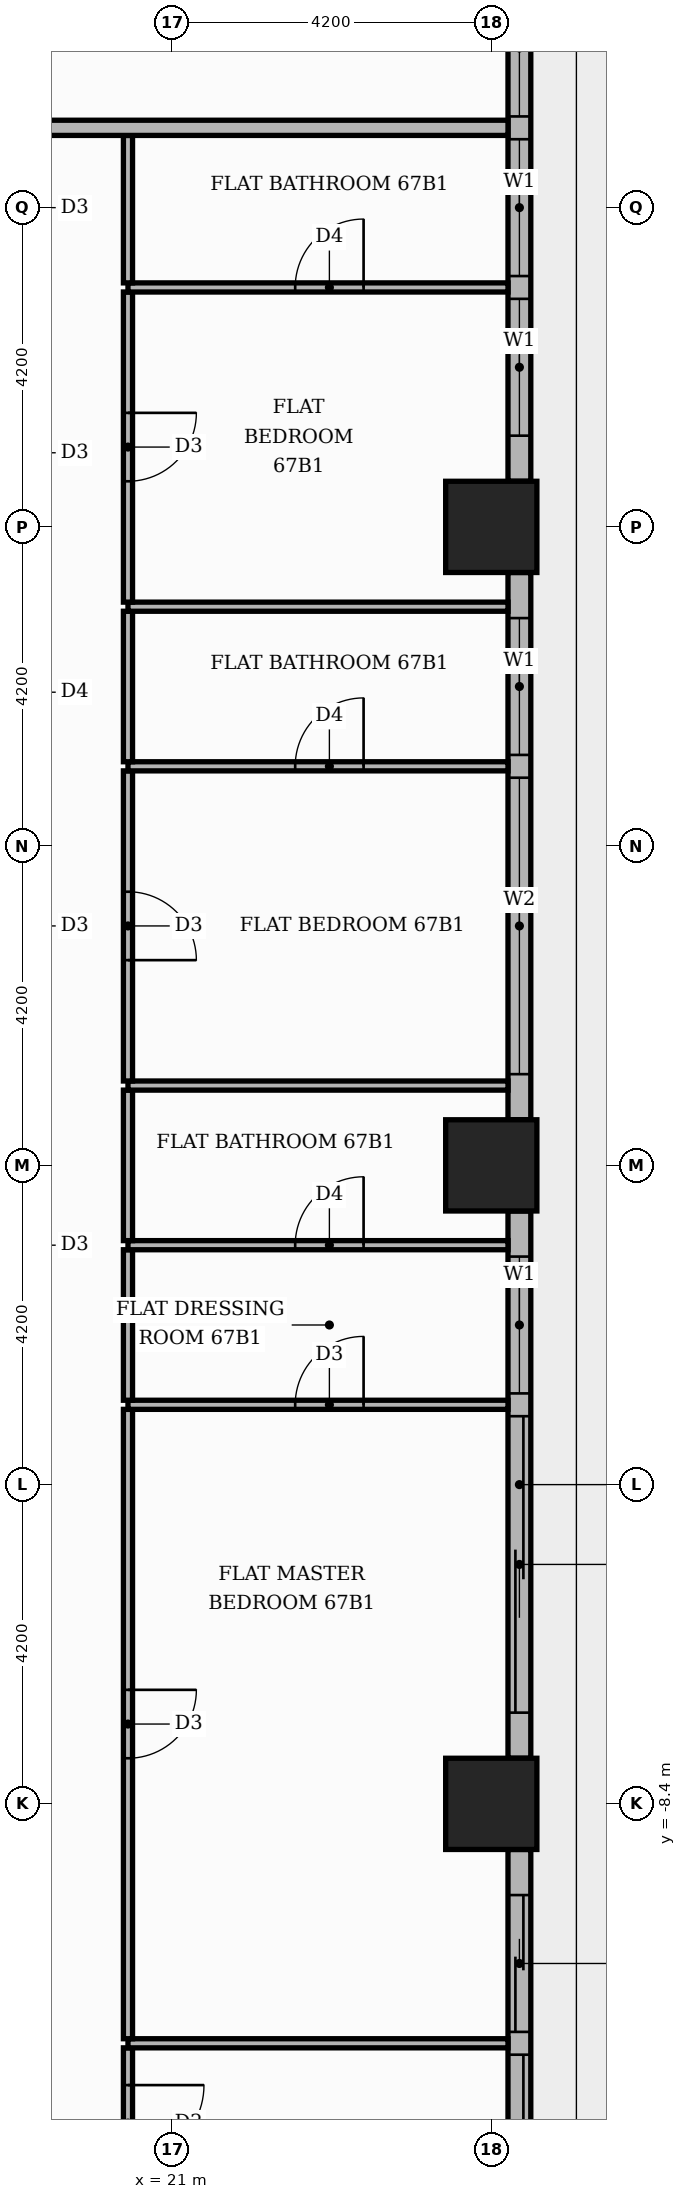
"""IFC4 building model, lengths in metres.
Left out: names, types, materials, properties, quantities, classifications, styles, units other than length and angle.
Written with IfcOpenShell. Run it as: python <this file> out.ifc"""

import sys

from ifc_helpers import new_model, si_unit, direction, frame, frame_2d, origin, origin_2d, place, context, subcontext, project, spatial, rectangle, extrude, element, fill, save


model = new_model("IFC4")
c1 = context("Model", 3, precision=1e-05, world=origin(), true_north=direction((0.0, 1.0)))
c2 = subcontext(c1, "Body", "Model", "MODEL_VIEW")
j1 = project(units=[si_unit("LENGTHUNIT", "METRE"), si_unit("PLANEANGLEUNIT", "RADIAN")], contexts=[c1])
p1 = place(None, origin())
s1 = spatial("IfcSite", under=j1, at=p1, CompositionType="ELEMENT")
p2 = place(p1, origin())
s2 = spatial("IfcBuilding", under=s1, at=p2, CompositionType="ELEMENT")
p3 = place(p2, frame((0.0, 0.0, 279.6)))
s3 = spatial("IfcBuildingStorey", under=s2, at=p3, CompositionType="ELEMENT", Elevation=279.6)
for number, where, z_axis, x_axis in (
    (1, (25.2, 0.0, 0.0), (0.0, 0.0, 1.0), (1.0, 0.0, 0.0)),
    (2, (25.2, 8.4, 0.0), (0.0, 0.0, 1.0), (1.0, 0.0, 0.0)),
    (3, (25.2, -8.4, 0.0), (0.0, 0.0, 1.0), (1.0, 0.0, 0.0)),
):
    element("IfcColumn", number, at=place(p3, frame(where, z_axis=z_axis, x_axis=x_axis)), inside=s3, PredefinedType="COLUMN", context=c2, shape_type="SweptSolid", body=[
        extrude(rectangle(XDim=1.2, YDim=1.2, at=origin_2d()), origin(), (0.0, 0.0, 1.0), 3.9),
    ])
p4 = place(p3, frame((25.57, -16.2, 0.0), z_axis=(0.0, 0.0, 1.0), x_axis=(0.0, 1.0, 0.0)))
e4 = element("IfcWall", 4, at=p4, inside=s3, PredefinedType="STANDARD", context=c2, shape_type="SweptSolid", body=[
    extrude(rectangle(XDim=7.2, YDim=0.3, at=frame_2d((3.6, 0.0))), origin(), (0.0, 0.0, 1.0), 3.48),
])
p5 = place(p4, frame((0.6, 0.0, 0.0)))
e5 = element("IfcOpeningElement", 5, at=p5, cuts=e4, PredefinedType="OPENING", context=c2, shape_type="SweptSolid", body=[
    extrude(rectangle(XDim=3.9, YDim=2.4, at=frame_2d((1.95, 1.2))), frame((0.0, 0.16, 0.0), z_axis=(0.0, -1.0, 0.0), x_axis=(1.0, 0.0, 0.0)), (0.0, 0.0, 1.0), 0.32),
])
p6 = place(p4, frame((4.8, 0.0, 0.0)))
e6 = element("IfcOpeningElement", 6, at=p6, cuts=e4, PredefinedType="OPENING", context=c2, shape_type="SweptSolid", body=[
    extrude(rectangle(XDim=1.8, YDim=2.4, at=frame_2d((0.9, 1.2))), frame((0.0, 0.16, 0.0), z_axis=(0.0, -1.0, 0.0), x_axis=(1.0, 0.0, 0.0)), (0.0, 0.0, 1.0), 0.32),
])
p7 = place(p3, frame((25.57, -7.8, 0.0), z_axis=(0.0, 0.0, 1.0), x_axis=(0.0, 1.0, 0.0)))
e7 = element("IfcWall", 7, at=p7, inside=s3, PredefinedType="STANDARD", context=c2, shape_type="SweptSolid", body=[
    extrude(rectangle(XDim=7.2, YDim=0.3, at=frame_2d((3.6, 0.0))), origin(), (0.0, 0.0, 1.0), 3.48),
])
p8 = place(p7, frame((0.6, 0.0, 0.0)))
e8 = element("IfcOpeningElement", 8, at=p8, cuts=e7, PredefinedType="OPENING", context=c2, shape_type="SweptSolid", body=[
    extrude(rectangle(XDim=3.9, YDim=2.4, at=frame_2d((1.95, 1.2))), frame((0.0, 0.16, 0.0), z_axis=(0.0, -1.0, 0.0), x_axis=(1.0, 0.0, 0.0)), (0.0, 0.0, 1.0), 0.32),
])
p9 = place(p7, frame((4.8, 0.0, 0.9)))
e9 = element("IfcOpeningElement", 9, at=p9, cuts=e7, PredefinedType="OPENING", context=c2, shape_type="SweptSolid", body=[
    extrude(rectangle(XDim=1.8, YDim=2.1, at=frame_2d((0.9, 1.05))), frame((0.0, 0.16, 0.0), z_axis=(0.0, -1.0, 0.0), x_axis=(1.0, 0.0, 0.0)), (0.0, 0.0, 1.0), 0.32),
])
p10 = place(p3, frame((25.57, 0.6, 0.0), z_axis=(0.0, 0.0, 1.0), x_axis=(0.0, 1.0, 0.0)))
e10 = element("IfcWall", 10, at=p10, inside=s3, PredefinedType="STANDARD", context=c2, shape_type="SweptSolid", body=[
    extrude(rectangle(XDim=7.2, YDim=0.3, at=frame_2d((3.6, 0.0))), origin(), (0.0, 0.0, 1.0), 3.48),
])
p11 = place(p10, frame((0.6, 0.0, 0.9)))
e11 = element("IfcOpeningElement", 11, at=p11, cuts=e10, PredefinedType="OPENING", context=c2, shape_type="SweptSolid", body=[
    extrude(rectangle(XDim=3.9, YDim=2.1, at=frame_2d((1.95, 1.05))), frame((0.0, 0.16, 0.0), z_axis=(0.0, -1.0, 0.0), x_axis=(1.0, 0.0, 0.0)), (0.0, 0.0, 1.0), 0.32),
])
p12 = place(p10, frame((4.8, 0.0, 0.9)))
e12 = element("IfcOpeningElement", 12, at=p12, cuts=e10, PredefinedType="OPENING", context=c2, shape_type="SweptSolid", body=[
    extrude(rectangle(XDim=1.8, YDim=2.1, at=frame_2d((0.9, 1.05))), frame((0.0, 0.16, 0.0), z_axis=(0.0, -1.0, 0.0), x_axis=(1.0, 0.0, 0.0)), (0.0, 0.0, 1.0), 0.32),
])
p13 = place(p3, frame((25.57, 9.0, 0.0), z_axis=(0.0, 0.0, 1.0), x_axis=(0.0, 1.0, 0.0)))
e13 = element("IfcWall", 13, at=p13, inside=s3, PredefinedType="STANDARD", context=c2, shape_type="SweptSolid", body=[
    extrude(rectangle(XDim=7.2, YDim=0.3, at=frame_2d((3.6, 0.0))), origin(), (0.0, 0.0, 1.0), 3.48),
])
p14 = place(p13, frame((0.6, 0.0, 0.9)))
e14 = element("IfcOpeningElement", 14, at=p14, cuts=e13, PredefinedType="OPENING", context=c2, shape_type="SweptSolid", body=[
    extrude(rectangle(XDim=1.8, YDim=2.1, at=frame_2d((0.9, 1.05))), frame((0.0, 0.16, 0.0), z_axis=(0.0, -1.0, 0.0), x_axis=(1.0, 0.0, 0.0)), (0.0, 0.0, 1.0), 0.32),
])
p15 = place(p13, frame((2.7, 0.0, 0.9)))
e15 = element("IfcOpeningElement", 15, at=p15, cuts=e13, PredefinedType="OPENING", context=c2, shape_type="SweptSolid", body=[
    extrude(rectangle(XDim=1.8, YDim=2.1, at=frame_2d((0.9, 1.05))), frame((0.0, 0.16, 0.0), z_axis=(0.0, -1.0, 0.0), x_axis=(1.0, 0.0, 0.0)), (0.0, 0.0, 1.0), 0.32),
])
p16 = place(p13, frame((4.8, 0.0, 0.9)))
e16 = element("IfcOpeningElement", 16, at=p16, cuts=e13, PredefinedType="OPENING", context=c2, shape_type="SweptSolid", body=[
    extrude(rectangle(XDim=1.8, YDim=2.1, at=frame_2d((0.9, 1.05))), frame((0.0, 0.16, 0.0), z_axis=(0.0, -1.0, 0.0), x_axis=(1.0, 0.0, 0.0)), (0.0, 0.0, 1.0), 0.32),
])
p17 = place(p3, frame((20.42, -13.59, 0.0), z_axis=(0.0, 0.0, 1.0), x_axis=(0.0, 1.0, 0.0)))
e17 = element("IfcWall", 17, at=p17, inside=s3, PredefinedType="PARTITIONING", context=c2, shape_type="SweptSolid", body=[
    extrude(rectangle(XDim=1.98, YDim=0.12, at=frame_2d((0.99, 0.0))), origin(), (0.0, 0.0, 1.0), 3.48),
])
p18 = place(p17, frame((0.49, 0.0, 0.0)))
e18 = element("IfcOpeningElement", 18, at=p18, cuts=e17, PredefinedType="OPENING", context=c2, shape_type="SweptSolid", body=[
    extrude(rectangle(XDim=1.0, YDim=2.1, at=frame_2d((0.5, 1.05))), frame((0.0, 0.07, 0.0), z_axis=(0.0, -1.0, 0.0), x_axis=(1.0, 0.0, 0.0)), (0.0, 0.0, 1.0), 0.14),
])
p19 = place(p3, frame((20.42, -11.55, 0.0), z_axis=(0.0, 0.0, 1.0), x_axis=(1.0, 0.0, 0.0)))
e19 = element("IfcWall", 19, at=p19, inside=s3, PredefinedType="PARTITIONING", context=c2, shape_type="SweptSolid", body=[
    extrude(rectangle(XDim=5.0, YDim=0.12, at=frame_2d((2.5, 0.0))), origin(), (0.0, 0.0, 1.0), 3.48),
])
p20 = place(p3, frame((20.42, -11.49, 0.0), z_axis=(0.0, 0.0, 1.0), x_axis=(0.0, 1.0, 0.0)))
e20 = element("IfcWall", 20, at=p20, inside=s3, PredefinedType="PARTITIONING", context=c2, shape_type="SweptSolid", body=[
    extrude(rectangle(XDim=8.28, YDim=0.12, at=frame_2d((4.14, 0.0))), origin(), (0.0, 0.0, 1.0), 3.48),
])
p21 = place(p20, frame((3.69, 0.0, 0.0)))
e21 = element("IfcOpeningElement", 21, at=p21, cuts=e20, PredefinedType="OPENING", context=c2, shape_type="SweptSolid", body=[
    extrude(rectangle(XDim=0.9, YDim=2.1, at=frame_2d((0.45, 1.05))), frame((0.0, 0.07, 0.0), z_axis=(0.0, -1.0, 0.0), x_axis=(1.0, 0.0, 0.0)), (0.0, 0.0, 1.0), 0.14),
])
p22 = place(p3, frame((20.42, -3.15, 0.0), z_axis=(0.0, 0.0, 1.0), x_axis=(1.0, 0.0, 0.0)))
e22 = element("IfcWall", 22, at=p22, inside=s3, PredefinedType="PARTITIONING", context=c2, shape_type="SweptSolid", body=[
    extrude(rectangle(XDim=5.0, YDim=0.12, at=frame_2d((2.5, 0.0))), origin(), (0.0, 0.0, 1.0), 3.48),
])
p23 = place(p22, frame((2.2, 0.0, 0.0)))
e23 = element("IfcOpeningElement", 23, at=p23, cuts=e22, PredefinedType="OPENING", context=c2, shape_type="SweptSolid", body=[
    extrude(rectangle(XDim=0.9, YDim=2.1, at=frame_2d((0.45, 1.05))), frame((0.0, 0.07, 0.0), z_axis=(0.0, -1.0, 0.0), x_axis=(1.0, 0.0, 0.0)), (0.0, 0.0, 1.0), 0.14),
])
p24 = place(p3, frame((20.42, -3.09, 0.0), z_axis=(0.0, 0.0, 1.0), x_axis=(0.0, 1.0, 0.0)))
e24 = element("IfcWall", 24, at=p24, inside=s3, PredefinedType="PARTITIONING", context=c2, shape_type="SweptSolid", body=[
    extrude(rectangle(XDim=1.98, YDim=0.12, at=frame_2d((0.99, 0.0))), origin(), (0.0, 0.0, 1.0), 3.48),
])
p25 = place(p3, frame((20.42, -1.05, 0.0), z_axis=(0.0, 0.0, 1.0), x_axis=(1.0, 0.0, 0.0)))
e25 = element("IfcWall", 25, at=p25, inside=s3, PredefinedType="PARTITIONING", context=c2, shape_type="SweptSolid", body=[
    extrude(rectangle(XDim=5.0, YDim=0.12, at=frame_2d((2.5, 0.0))), origin(), (0.0, 0.0, 1.0), 3.48),
])
p26 = place(p25, frame((2.2, 0.0, 0.0)))
e26 = element("IfcOpeningElement", 26, at=p26, cuts=e25, PredefinedType="OPENING", context=c2, shape_type="SweptSolid", body=[
    extrude(rectangle(XDim=0.9, YDim=2.1, at=frame_2d((0.45, 1.05))), frame((0.0, 0.07, 0.0), z_axis=(0.0, -1.0, 0.0), x_axis=(1.0, 0.0, 0.0)), (0.0, 0.0, 1.0), 0.14),
])
p27 = place(p3, frame((20.42, -0.99, 0.0), z_axis=(0.0, 0.0, 1.0), x_axis=(0.0, 1.0, 0.0)))
e27 = element("IfcWall", 27, at=p27, inside=s3, PredefinedType="PARTITIONING", context=c2, shape_type="SweptSolid", body=[
    extrude(rectangle(XDim=1.98, YDim=0.12, at=frame_2d((0.99, 0.0))), origin(), (0.0, 0.0, 1.0), 3.48),
])
p28 = place(p3, frame((20.42, 1.05, 0.0), z_axis=(0.0, 0.0, 1.0), x_axis=(1.0, 0.0, 0.0)))
e28 = element("IfcWall", 28, at=p28, inside=s3, PredefinedType="PARTITIONING", context=c2, shape_type="SweptSolid", body=[
    extrude(rectangle(XDim=5.0, YDim=0.12, at=frame_2d((2.5, 0.0))), origin(), (0.0, 0.0, 1.0), 3.48),
])
p29 = place(p3, frame((20.42, 1.11, 0.0), z_axis=(0.0, 0.0, 1.0), x_axis=(0.0, 1.0, 0.0)))
e29 = element("IfcWall", 29, at=p29, inside=s3, PredefinedType="PARTITIONING", context=c2, shape_type="SweptSolid", body=[
    extrude(rectangle(XDim=4.08, YDim=0.12, at=frame_2d((2.04, 0.0))), origin(), (0.0, 0.0, 1.0), 3.48),
])
p30 = place(p29, frame((1.59, 0.0, 0.0)))
e30 = element("IfcOpeningElement", 30, at=p30, cuts=e29, PredefinedType="OPENING", context=c2, shape_type="SweptSolid", body=[
    extrude(rectangle(XDim=0.9, YDim=2.1, at=frame_2d((0.45, 1.05))), frame((0.0, 0.07, 0.0), z_axis=(0.0, -1.0, 0.0), x_axis=(1.0, 0.0, 0.0)), (0.0, 0.0, 1.0), 0.14),
])
p31 = place(p3, frame((20.42, 5.25, 0.0), z_axis=(0.0, 0.0, 1.0), x_axis=(1.0, 0.0, 0.0)))
e31 = element("IfcWall", 31, at=p31, inside=s3, PredefinedType="PARTITIONING", context=c2, shape_type="SweptSolid", body=[
    extrude(rectangle(XDim=5.0, YDim=0.12, at=frame_2d((2.5, 0.0))), origin(), (0.0, 0.0, 1.0), 3.48),
])
p32 = place(p31, frame((2.2, 0.0, 0.0)))
e32 = element("IfcOpeningElement", 32, at=p32, cuts=e31, PredefinedType="OPENING", context=c2, shape_type="SweptSolid", body=[
    extrude(rectangle(XDim=0.9, YDim=2.1, at=frame_2d((0.45, 1.05))), frame((0.0, 0.07, 0.0), z_axis=(0.0, -1.0, 0.0), x_axis=(1.0, 0.0, 0.0)), (0.0, 0.0, 1.0), 0.14),
])
p33 = place(p3, frame((20.42, 5.31, 0.0), z_axis=(0.0, 0.0, 1.0), x_axis=(0.0, 1.0, 0.0)))
e33 = element("IfcWall", 33, at=p33, inside=s3, PredefinedType="PARTITIONING", context=c2, shape_type="SweptSolid", body=[
    extrude(rectangle(XDim=1.98, YDim=0.12, at=frame_2d((0.99, 0.0))), origin(), (0.0, 0.0, 1.0), 3.48),
])
p34 = place(p3, frame((20.42, 7.35, 0.0), z_axis=(0.0, 0.0, 1.0), x_axis=(1.0, 0.0, 0.0)))
e34 = element("IfcWall", 34, at=p34, inside=s3, PredefinedType="PARTITIONING", context=c2, shape_type="SweptSolid", body=[
    extrude(rectangle(XDim=5.0, YDim=0.12, at=frame_2d((2.5, 0.0))), origin(), (0.0, 0.0, 1.0), 3.48),
])
p35 = place(p3, frame((20.42, 7.41, 0.0), z_axis=(0.0, 0.0, 1.0), x_axis=(0.0, 1.0, 0.0)))
e35 = element("IfcWall", 35, at=p35, inside=s3, PredefinedType="PARTITIONING", context=c2, shape_type="SweptSolid", body=[
    extrude(rectangle(XDim=4.08, YDim=0.12, at=frame_2d((2.04, 0.0))), origin(), (0.0, 0.0, 1.0), 3.48),
])
p36 = place(p35, frame((1.59, 0.0, 0.0)))
e36 = element("IfcOpeningElement", 36, at=p36, cuts=e35, PredefinedType="OPENING", context=c2, shape_type="SweptSolid", body=[
    extrude(rectangle(XDim=0.9, YDim=2.1, at=frame_2d((0.45, 1.05))), frame((0.0, 0.07, 0.0), z_axis=(0.0, -1.0, 0.0), x_axis=(1.0, 0.0, 0.0)), (0.0, 0.0, 1.0), 0.14),
])
p37 = place(p3, frame((20.42, 11.55, 0.0), z_axis=(0.0, 0.0, 1.0), x_axis=(1.0, 0.0, 0.0)))
e37 = element("IfcWall", 37, at=p37, inside=s3, PredefinedType="PARTITIONING", context=c2, shape_type="SweptSolid", body=[
    extrude(rectangle(XDim=5.0, YDim=0.12, at=frame_2d((2.5, 0.0))), origin(), (0.0, 0.0, 1.0), 3.48),
])
p38 = place(p37, frame((2.2, 0.0, 0.0)))
e38 = element("IfcOpeningElement", 38, at=p38, cuts=e37, PredefinedType="OPENING", context=c2, shape_type="SweptSolid", body=[
    extrude(rectangle(XDim=0.9, YDim=2.1, at=frame_2d((0.45, 1.05))), frame((0.0, 0.07, 0.0), z_axis=(0.0, -1.0, 0.0), x_axis=(1.0, 0.0, 0.0)), (0.0, 0.0, 1.0), 0.14),
])
p39 = place(p3, frame((20.42, 11.61, 0.0), z_axis=(0.0, 0.0, 1.0), x_axis=(0.0, 1.0, 0.0)))
e39 = element("IfcWall", 39, at=p39, inside=s3, PredefinedType="PARTITIONING", context=c2, shape_type="SweptSolid", body=[
    extrude(rectangle(XDim=1.94, YDim=0.12, at=frame_2d((0.97, 0.0))), origin(), (0.0, 0.0, 1.0), 3.48),
])
p40 = place(p3, frame((-13.65, 13.65, 0.0), z_axis=(0.0, 0.0, 1.0), x_axis=(1.0, 0.0, 0.0)))
e40 = element("IfcWall", 40, at=p40, inside=s3, PredefinedType="PARTITIONING", context=c2, shape_type="SweptSolid", body=[
    extrude(rectangle(XDim=39.07, YDim=0.2, at=frame_2d((19.535, 0.0))), origin(), (0.0, 0.0, 1.0), 3.48),
])
p41 = place(p40, frame((23.6, 0.0, 0.0)))
e41 = element("IfcOpeningElement", 41, at=p41, cuts=e40, PredefinedType="OPENING", context=c2, shape_type="SweptSolid", body=[
    extrude(rectangle(XDim=1.1, YDim=2.4, at=frame_2d((0.55, 1.2))), frame((0.0, 0.11, 0.0), z_axis=(0.0, -1.0, 0.0), x_axis=(1.0, 0.0, 0.0)), (0.0, 0.0, 1.0), 0.22),
])
p42 = place(p5, origin())
e42 = element("IfcDoor", 42, at=p42, inside=s3, OperationType="SLIDING_TO_LEFT", PredefinedType="DOOR", context=c2, shape_type="SweptSolid", body=[
    extrude(rectangle(XDim=3.9, YDim=2.4, at=frame_2d((1.95, 1.2))), frame((0.0, 0.025, 0.0), z_axis=(0.0, -1.0, 0.0), x_axis=(1.0, 0.0, 0.0)), (0.0, 0.0, 1.0), 0.05),
])
fill(e5, e42)
p43 = place(p6, origin())
e43 = element("IfcDoor", 43, at=p43, inside=s3, OperationType="SLIDING_TO_RIGHT", PredefinedType="DOOR", context=c2, shape_type="SweptSolid", body=[
    extrude(rectangle(XDim=1.8, YDim=2.4, at=frame_2d((0.9, 1.2))), frame((0.0, 0.025, 0.0), z_axis=(0.0, -1.0, 0.0), x_axis=(1.0, 0.0, 0.0)), (0.0, 0.0, 1.0), 0.05),
])
fill(e6, e43)
p44 = place(p8, origin())
e44 = element("IfcDoor", 44, at=p44, inside=s3, OperationType="SLIDING_TO_LEFT", PredefinedType="DOOR", context=c2, shape_type="SweptSolid", body=[
    extrude(rectangle(XDim=3.9, YDim=2.4, at=frame_2d((1.95, 1.2))), frame((0.0, 0.025, 0.0), z_axis=(0.0, -1.0, 0.0), x_axis=(1.0, 0.0, 0.0)), (0.0, 0.0, 1.0), 0.05),
])
fill(e8, e44)
p45 = place(p9, origin())
e45 = element("IfcWindow", 45, at=p45, inside=s3, PartitioningType="SINGLE_PANEL", PredefinedType="WINDOW", context=c2, shape_type="SweptSolid", body=[
    extrude(rectangle(XDim=1.8, YDim=2.1, at=frame_2d((0.9, 1.05))), frame((0.0, 0.03, 0.0), z_axis=(0.0, -1.0, 0.0), x_axis=(1.0, 0.0, 0.0)), (0.0, 0.0, 1.0), 0.06),
])
fill(e9, e45)
p46 = place(p11, origin())
e46 = element("IfcWindow", 46, at=p46, inside=s3, PartitioningType="SINGLE_PANEL", PredefinedType="WINDOW", context=c2, shape_type="SweptSolid", body=[
    extrude(rectangle(XDim=3.9, YDim=2.1, at=frame_2d((1.95, 1.05))), frame((0.0, 0.03, 0.0), z_axis=(0.0, -1.0, 0.0), x_axis=(1.0, 0.0, 0.0)), (0.0, 0.0, 1.0), 0.06),
])
fill(e11, e46)
p47 = place(p12, origin())
e47 = element("IfcWindow", 47, at=p47, inside=s3, PartitioningType="SINGLE_PANEL", PredefinedType="WINDOW", context=c2, shape_type="SweptSolid", body=[
    extrude(rectangle(XDim=1.8, YDim=2.1, at=frame_2d((0.9, 1.05))), frame((0.0, 0.03, 0.0), z_axis=(0.0, -1.0, 0.0), x_axis=(1.0, 0.0, 0.0)), (0.0, 0.0, 1.0), 0.06),
])
fill(e12, e47)
p48 = place(p14, origin())
e48 = element("IfcWindow", 48, at=p48, inside=s3, PartitioningType="SINGLE_PANEL", PredefinedType="WINDOW", context=c2, shape_type="SweptSolid", body=[
    extrude(rectangle(XDim=1.8, YDim=2.1, at=frame_2d((0.9, 1.05))), frame((0.0, 0.03, 0.0), z_axis=(0.0, -1.0, 0.0), x_axis=(1.0, 0.0, 0.0)), (0.0, 0.0, 1.0), 0.06),
])
fill(e14, e48)
p49 = place(p15, origin())
e49 = element("IfcWindow", 49, at=p49, inside=s3, PartitioningType="SINGLE_PANEL", PredefinedType="WINDOW", context=c2, shape_type="SweptSolid", body=[
    extrude(rectangle(XDim=1.8, YDim=2.1, at=frame_2d((0.9, 1.05))), frame((0.0, 0.03, 0.0), z_axis=(0.0, -1.0, 0.0), x_axis=(1.0, 0.0, 0.0)), (0.0, 0.0, 1.0), 0.06),
])
fill(e15, e49)
p50 = place(p16, origin())
e50 = element("IfcWindow", 50, at=p50, inside=s3, PartitioningType="SINGLE_PANEL", PredefinedType="WINDOW", context=c2, shape_type="SweptSolid", body=[
    extrude(rectangle(XDim=1.8, YDim=2.1, at=frame_2d((0.9, 1.05))), frame((0.0, 0.03, 0.0), z_axis=(0.0, -1.0, 0.0), x_axis=(1.0, 0.0, 0.0)), (0.0, 0.0, 1.0), 0.06),
])
fill(e16, e50)
p51 = place(p18, frame((1.0, 0.0, 0.0), z_axis=(0.0, 0.0, 1.0), x_axis=(-1.0, 0.0, 0.0)))
e51 = element("IfcDoor", 51, at=p51, inside=s3, OperationType="SINGLE_SWING_RIGHT", PredefinedType="DOOR", context=c2, shape_type="SweptSolid", body=[
    extrude(rectangle(XDim=1.0, YDim=2.1, at=frame_2d((0.5, 1.05))), frame((0.0, 0.025, 0.0), z_axis=(0.0, -1.0, 0.0), x_axis=(1.0, 0.0, 0.0)), (0.0, 0.0, 1.0), 0.05),
])
fill(e18, e51)
p52 = place(p21, frame((0.9, 0.0, 0.0), z_axis=(0.0, 0.0, 1.0), x_axis=(-1.0, 0.0, 0.0)))
e52 = element("IfcDoor", 52, at=p52, inside=s3, OperationType="SINGLE_SWING_RIGHT", PredefinedType="DOOR", context=c2, shape_type="SweptSolid", body=[
    extrude(rectangle(XDim=0.9, YDim=2.1, at=frame_2d((0.45, 1.05))), frame((0.0, 0.025, 0.0), z_axis=(0.0, -1.0, 0.0), x_axis=(1.0, 0.0, 0.0)), (0.0, 0.0, 1.0), 0.05),
])
fill(e21, e52)
p53 = place(p23, origin())
e53 = element("IfcDoor", 53, at=p53, inside=s3, OperationType="SINGLE_SWING_RIGHT", PredefinedType="DOOR", context=c2, shape_type="SweptSolid", body=[
    extrude(rectangle(XDim=0.9, YDim=2.1, at=frame_2d((0.45, 1.05))), frame((0.0, 0.025, 0.0), z_axis=(0.0, -1.0, 0.0), x_axis=(1.0, 0.0, 0.0)), (0.0, 0.0, 1.0), 0.05),
])
fill(e23, e53)
p54 = place(p26, origin())
e54 = element("IfcDoor", 54, at=p54, inside=s3, OperationType="SINGLE_SWING_RIGHT", PredefinedType="DOOR", context=c2, shape_type="SweptSolid", body=[
    extrude(rectangle(XDim=0.9, YDim=2.1, at=frame_2d((0.45, 1.05))), frame((0.0, 0.025, 0.0), z_axis=(0.0, -1.0, 0.0), x_axis=(1.0, 0.0, 0.0)), (0.0, 0.0, 1.0), 0.05),
])
fill(e26, e54)
p55 = place(p30, frame((0.9, 0.0, 0.0), z_axis=(0.0, 0.0, 1.0), x_axis=(-1.0, 0.0, 0.0)))
e55 = element("IfcDoor", 55, at=p55, inside=s3, OperationType="SINGLE_SWING_LEFT", PredefinedType="DOOR", context=c2, shape_type="SweptSolid", body=[
    extrude(rectangle(XDim=0.9, YDim=2.1, at=frame_2d((0.45, 1.05))), frame((0.0, 0.025, 0.0), z_axis=(0.0, -1.0, 0.0), x_axis=(1.0, 0.0, 0.0)), (0.0, 0.0, 1.0), 0.05),
])
fill(e30, e55)
p56 = place(p32, origin())
e56 = element("IfcDoor", 56, at=p56, inside=s3, OperationType="SINGLE_SWING_RIGHT", PredefinedType="DOOR", context=c2, shape_type="SweptSolid", body=[
    extrude(rectangle(XDim=0.9, YDim=2.1, at=frame_2d((0.45, 1.05))), frame((0.0, 0.025, 0.0), z_axis=(0.0, -1.0, 0.0), x_axis=(1.0, 0.0, 0.0)), (0.0, 0.0, 1.0), 0.05),
])
fill(e32, e56)
p57 = place(p36, frame((0.9, 0.0, 0.0), z_axis=(0.0, 0.0, 1.0), x_axis=(-1.0, 0.0, 0.0)))
e57 = element("IfcDoor", 57, at=p57, inside=s3, OperationType="SINGLE_SWING_RIGHT", PredefinedType="DOOR", context=c2, shape_type="SweptSolid", body=[
    extrude(rectangle(XDim=0.9, YDim=2.1, at=frame_2d((0.45, 1.05))), frame((0.0, 0.025, 0.0), z_axis=(0.0, -1.0, 0.0), x_axis=(1.0, 0.0, 0.0)), (0.0, 0.0, 1.0), 0.05),
])
fill(e36, e57)
p58 = place(p38, origin())
e58 = element("IfcDoor", 58, at=p58, inside=s3, OperationType="SINGLE_SWING_RIGHT", PredefinedType="DOOR", context=c2, shape_type="SweptSolid", body=[
    extrude(rectangle(XDim=0.9, YDim=2.1, at=frame_2d((0.45, 1.05))), frame((0.0, 0.025, 0.0), z_axis=(0.0, -1.0, 0.0), x_axis=(1.0, 0.0, 0.0)), (0.0, 0.0, 1.0), 0.05),
])
fill(e38, e58)
save(model, sys.argv[1])
